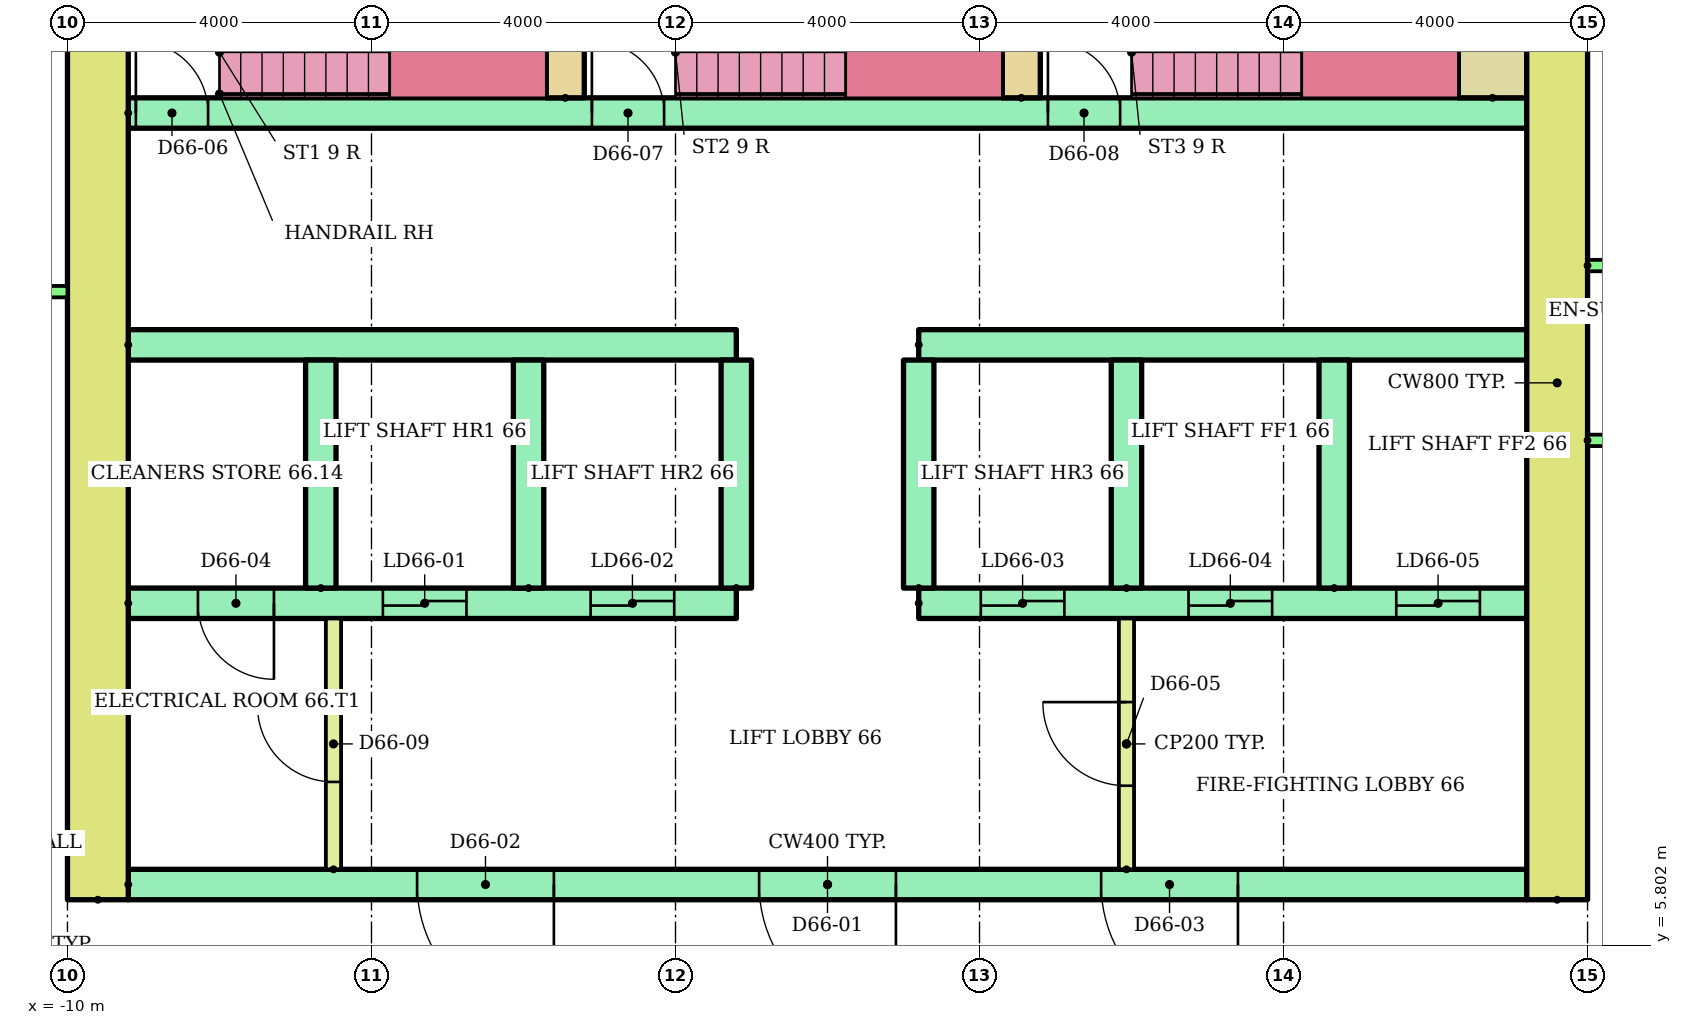
"""IFC4 building model, lengths in metres.
Left out: names, types, materials, properties, quantities, classifications, styles, units other than length and angle.
Written with IfcOpenShell. Run it as: python <this file> out.ifc"""

import sys

from ifc_helpers import new_model, si_unit, direction, frame, frame_2d, origin, place, context, subcontext, project, spatial, rectangle, extrude, element, fill, save


model = new_model("IFC4")
c1 = context("Model", 3, precision=1e-05, world=origin(), true_north=direction((0.0, 1.0)))
c2 = subcontext(c1, "Body", "Model", "MODEL_VIEW")
j1 = project(units=[si_unit("LENGTHUNIT", "METRE"), si_unit("PLANEANGLEUNIT", "RADIAN")], contexts=[c1])
p1 = place(None, origin())
s1 = spatial("IfcSite", under=j1, at=p1, CompositionType="ELEMENT")
p2 = place(p1, origin())
s2 = spatial("IfcBuilding", under=s1, at=p2, CompositionType="ELEMENT")
p3 = place(p2, frame((0.0, 0.0, 256.3)))
s3 = spatial("IfcBuildingStorey", under=s2, at=p3, CompositionType="ELEMENT", Elevation=256.3)
for number, where, z_axis, x_axis in (
    (1, (-9.6, 6.4, 0.0), (0.0, 0.0, 1.0), (0.0, 1.0, 0.0)),
    (2, (9.6, 6.4, 0.0), (0.0, 0.0, 1.0), (0.0, 1.0, 0.0)),
):
    element("IfcWall", number, at=place(p3, frame(where, z_axis=z_axis, x_axis=x_axis)), inside=s3, PredefinedType="SHEAR", context=c2, shape_type="SweptSolid", body=[
        extrude(rectangle(XDim=13.6, YDim=0.8, at=frame_2d((6.8, 0.0))), origin(), (0.0, 0.0, 1.0), 2.92),
    ])
p4 = place(p3, frame((-9.2, 6.6, 0.0)))
e3 = element("IfcWall", 3, at=p4, inside=s3, PredefinedType="SHEAR", context=c2, shape_type="SweptSolid", body=[
    extrude(rectangle(XDim=18.4, YDim=0.4, at=frame_2d((9.2, 0.0))), origin(), (0.0, 0.0, 1.0), 2.92),
])
p5 = place(p4, frame((8.3, 0.0, 0.0)))
e4 = element("IfcOpeningElement", 4, at=p5, cuts=e3, PredefinedType="OPENING", context=c2, shape_type="SweptSolid", body=[
    extrude(rectangle(XDim=1.8, YDim=2.1, at=frame_2d((0.9, 1.05))), frame((0.0, 0.21, 0.0), z_axis=(0.0, -1.0, 0.0), x_axis=(1.0, 0.0, 0.0)), (0.0, 0.0, 1.0), 0.42),
])
p6 = place(p4, frame((3.8, 0.0, 0.0)))
e5 = element("IfcOpeningElement", 5, at=p6, cuts=e3, PredefinedType="OPENING", context=c2, shape_type="SweptSolid", body=[
    extrude(rectangle(XDim=1.8, YDim=2.1, at=frame_2d((0.9, 1.05))), frame((0.0, 0.21, 0.0), z_axis=(0.0, -1.0, 0.0), x_axis=(1.0, 0.0, 0.0)), (0.0, 0.0, 1.0), 0.42),
])
p7 = place(p4, frame((12.8, 0.0, 0.0)))
e6 = element("IfcOpeningElement", 6, at=p7, cuts=e3, PredefinedType="OPENING", context=c2, shape_type="SweptSolid", body=[
    extrude(rectangle(XDim=1.8, YDim=2.1, at=frame_2d((0.9, 1.05))), frame((0.0, 0.21, 0.0), z_axis=(0.0, -1.0, 0.0), x_axis=(1.0, 0.0, 0.0)), (0.0, 0.0, 1.0), 0.42),
])
p8 = place(p3, frame((-9.2, 10.3, 0.0)))
e7 = element("IfcWall", 7, at=p8, inside=s3, PredefinedType="SHEAR", context=c2, shape_type="SweptSolid", body=[
    extrude(rectangle(XDim=8.0, YDim=0.4, at=frame_2d((4.0, 0.0))), origin(), (0.0, 0.0, 1.0), 2.92),
])
p9 = place(p8, frame((3.35, 0.0, 0.0)))
e8 = element("IfcOpeningElement", 8, at=p9, cuts=e7, PredefinedType="OPENING", context=c2, shape_type="SweptSolid", body=[
    extrude(rectangle(XDim=1.1, YDim=2.1, at=frame_2d((0.55, 1.05))), frame((0.0, 0.21, 0.0), z_axis=(0.0, -1.0, 0.0), x_axis=(1.0, 0.0, 0.0)), (0.0, 0.0, 1.0), 0.42),
])
p10 = place(p8, frame((6.083, 0.0, 0.0)))
e9 = element("IfcOpeningElement", 9, at=p10, cuts=e7, PredefinedType="OPENING", context=c2, shape_type="SweptSolid", body=[
    extrude(rectangle(XDim=1.1, YDim=2.1, at=frame_2d((0.55, 1.05))), frame((0.0, 0.21, 0.0), z_axis=(0.0, -1.0, 0.0), x_axis=(1.0, 0.0, 0.0)), (0.0, 0.0, 1.0), 0.42),
])
p11 = place(p8, frame((0.917, 0.0, 0.0)))
e10 = element("IfcOpeningElement", 10, at=p11, cuts=e7, PredefinedType="OPENING", context=c2, shape_type="SweptSolid", body=[
    extrude(rectangle(XDim=1.0, YDim=2.1, at=frame_2d((0.5, 1.05))), frame((0.0, 0.21, 0.0), z_axis=(0.0, -1.0, 0.0), x_axis=(1.0, 0.0, 0.0)), (0.0, 0.0, 1.0), 0.42),
])
p12 = place(p3, frame((-9.2, 13.7, 0.0)))
e11 = element("IfcWall", 11, at=p12, inside=s3, PredefinedType="SHEAR", context=c2, shape_type="SweptSolid", body=[
    extrude(rectangle(XDim=8.0, YDim=0.4, at=frame_2d((4.0, 0.0))), origin(), (0.0, 0.0, 1.0), 2.92),
])
p13 = place(p3, frame((1.2, 10.3, 0.0)))
e12 = element("IfcWall", 12, at=p13, inside=s3, PredefinedType="SHEAR", context=c2, shape_type="SweptSolid", body=[
    extrude(rectangle(XDim=8.0, YDim=0.4, at=frame_2d((4.0, 0.0))), origin(), (0.0, 0.0, 1.0), 2.92),
])
p14 = place(p13, frame((0.817, 0.0, 0.0)))
e13 = element("IfcOpeningElement", 13, at=p14, cuts=e12, PredefinedType="OPENING", context=c2, shape_type="SweptSolid", body=[
    extrude(rectangle(XDim=1.1, YDim=2.1, at=frame_2d((0.55, 1.05))), frame((0.0, 0.21, 0.0), z_axis=(0.0, -1.0, 0.0), x_axis=(1.0, 0.0, 0.0)), (0.0, 0.0, 1.0), 0.42),
])
p15 = place(p13, frame((3.55, 0.0, 0.0)))
e14 = element("IfcOpeningElement", 14, at=p15, cuts=e12, PredefinedType="OPENING", context=c2, shape_type="SweptSolid", body=[
    extrude(rectangle(XDim=1.1, YDim=2.1, at=frame_2d((0.55, 1.05))), frame((0.0, 0.21, 0.0), z_axis=(0.0, -1.0, 0.0), x_axis=(1.0, 0.0, 0.0)), (0.0, 0.0, 1.0), 0.42),
])
p16 = place(p13, frame((6.283, 0.0, 0.0)))
e15 = element("IfcOpeningElement", 15, at=p16, cuts=e12, PredefinedType="OPENING", context=c2, shape_type="SweptSolid", body=[
    extrude(rectangle(XDim=1.1, YDim=2.1, at=frame_2d((0.55, 1.05))), frame((0.0, 0.21, 0.0), z_axis=(0.0, -1.0, 0.0), x_axis=(1.0, 0.0, 0.0)), (0.0, 0.0, 1.0), 0.42),
])
p17 = place(p3, frame((1.2, 13.7, 0.0)))
e16 = element("IfcWall", 16, at=p17, inside=s3, PredefinedType="SHEAR", context=c2, shape_type="SweptSolid", body=[
    extrude(rectangle(XDim=8.0, YDim=0.4, at=frame_2d((4.0, 0.0))), origin(), (0.0, 0.0, 1.0), 2.92),
])
for number, where, z_axis, x_axis in (
    (17, (-6.667, 10.5, 0.0), (0.0, 0.0, 1.0), (0.0, 1.0, 0.0)),
    (18, (-3.933, 10.5, 0.0), (0.0, 0.0, 1.0), (0.0, 1.0, 0.0)),
    (19, (-1.2, 10.5, 0.0), (0.0, 0.0, 1.0), (0.0, 1.0, 0.0)),
    (20, (1.2, 10.5, 0.0), (0.0, 0.0, 1.0), (0.0, 1.0, 0.0)),
    (21, (3.933, 10.5, 0.0), (0.0, 0.0, 1.0), (0.0, 1.0, 0.0)),
    (22, (6.667, 10.5, 0.0), (0.0, 0.0, 1.0), (0.0, 1.0, 0.0)),
):
    element("IfcWall", number, at=place(p3, frame(where, z_axis=z_axis, x_axis=x_axis)), inside=s3, PredefinedType="SHEAR", context=c2, shape_type="SweptSolid", body=[
        extrude(rectangle(XDim=3.0, YDim=0.4, at=frame_2d((1.5, 0.0))), origin(), (0.0, 0.0, 1.0), 2.92),
    ])
p18 = place(p3, frame((3.933, 6.8, 0.0), z_axis=(0.0, 0.0, 1.0), x_axis=(0.0, 1.0, 0.0)))
e23 = element("IfcWall", 23, at=p18, inside=s3, PredefinedType="PARTITIONING", context=c2, shape_type="SweptSolid", body=[
    extrude(rectangle(XDim=3.3, YDim=0.2, at=frame_2d((1.65, 0.0))), origin(), (0.0, 0.0, 1.0), 2.92),
])
p19 = place(p18, frame((1.1, 0.0, 0.0)))
e24 = element("IfcOpeningElement", 24, at=p19, cuts=e23, PredefinedType="OPENING", context=c2, shape_type="SweptSolid", body=[
    extrude(rectangle(XDim=1.1, YDim=2.1, at=frame_2d((0.55, 1.05))), frame((0.0, 0.11, 0.0), z_axis=(0.0, -1.0, 0.0), x_axis=(1.0, 0.0, 0.0)), (0.0, 0.0, 1.0), 0.22),
])
p20 = place(p3, frame((-9.2, 16.75, 0.0)))
e25 = element("IfcWall", 25, at=p20, inside=s3, PredefinedType="SHEAR", context=c2, shape_type="SweptSolid", body=[
    extrude(rectangle(XDim=18.4, YDim=0.4, at=frame_2d((9.2, 0.0))), origin(), (0.0, 0.0, 1.0), 2.92),
])
p21 = place(p20, frame((0.1, 0.0, 0.0)))
e26 = element("IfcOpeningElement", 26, at=p21, cuts=e25, PredefinedType="OPENING", context=c2, shape_type="SweptSolid", body=[
    extrude(rectangle(XDim=0.95, YDim=2.1, at=frame_2d((0.475, 1.05))), frame((0.0, 0.21, 0.0), z_axis=(0.0, -1.0, 0.0), x_axis=(1.0, 0.0, 0.0)), (0.0, 0.0, 1.0), 0.42),
])
p22 = place(p20, frame((6.1, 0.0, 0.0)))
e27 = element("IfcOpeningElement", 27, at=p22, cuts=e25, PredefinedType="OPENING", context=c2, shape_type="SweptSolid", body=[
    extrude(rectangle(XDim=0.95, YDim=2.1, at=frame_2d((0.475, 1.05))), frame((0.0, 0.21, 0.0), z_axis=(0.0, -1.0, 0.0), x_axis=(1.0, 0.0, 0.0)), (0.0, 0.0, 1.0), 0.42),
])
p23 = place(p20, frame((12.1, 0.0, 0.0)))
e28 = element("IfcOpeningElement", 28, at=p23, cuts=e25, PredefinedType="OPENING", context=c2, shape_type="SweptSolid", body=[
    extrude(rectangle(XDim=0.95, YDim=2.1, at=frame_2d((0.475, 1.05))), frame((0.0, 0.21, 0.0), z_axis=(0.0, -1.0, 0.0), x_axis=(1.0, 0.0, 0.0)), (0.0, 0.0, 1.0), 0.42),
])
for number, where, z_axis, x_axis in (
    (29, (-3.45, 16.95, 0.0), (0.0, 0.0, 1.0), (0.0, 1.0, 0.0)),
    (30, (2.55, 16.95, 0.0), (0.0, 0.0, 1.0), (0.0, 1.0, 0.0)),
):
    element("IfcWall", number, at=place(p3, frame(where, z_axis=z_axis, x_axis=x_axis)), inside=s3, PredefinedType="SHEAR", context=c2, shape_type="SweptSolid", body=[
        extrude(rectangle(XDim=2.55, YDim=0.5, at=frame_2d((1.275, 0.0))), origin(), (0.0, 0.0, 1.0), 2.92),
    ])
p24 = place(p3, frame((8.75, 16.95, 0.0), z_axis=(0.0, 0.0, 1.0), x_axis=(0.0, 1.0, 0.0)))
e31 = element("IfcWall", 31, at=p24, inside=s3, PredefinedType="SHEAR", context=c2, shape_type="SweptSolid", body=[
    extrude(rectangle(XDim=2.55, YDim=0.9, at=frame_2d((1.275, 0.0))), origin(), (0.0, 0.0, 1.0), 2.92),
])
p25 = place(p3, frame((-6.5, 6.8, 0.0), z_axis=(0.0, 0.0, 1.0), x_axis=(0.0, 1.0, 0.0)))
e32 = element("IfcWall", 32, at=p25, inside=s3, PredefinedType="PARTITIONING", context=c2, shape_type="SweptSolid", body=[
    extrude(rectangle(XDim=3.3, YDim=0.2, at=frame_2d((1.65, 0.0))), origin(), (0.0, 0.0, 1.0), 2.92),
])
p26 = place(p25, frame((1.15, 0.0, 0.0)))
e33 = element("IfcOpeningElement", 33, at=p26, cuts=e32, PredefinedType="OPENING", context=c2, shape_type="SweptSolid", body=[
    extrude(rectangle(XDim=1.0, YDim=2.1, at=frame_2d((0.5, 1.05))), frame((0.0, 0.11, 0.0), z_axis=(0.0, -1.0, 0.0), x_axis=(1.0, 0.0, 0.0)), (0.0, 0.0, 1.0), 0.22),
])
p27 = place(p3, frame((-21.89, 14.4, 0.0)))
e34 = element("IfcWall", 34, at=p27, inside=s3, PredefinedType="PARTITIONING", context=c2, shape_type="SweptSolid", body=[
    extrude(rectangle(XDim=11.89, YDim=0.15, at=frame_2d((5.945, 0.0))), origin(), (0.0, 0.0, 1.0), 2.4),
])
p28 = place(p27, frame((1.26, 0.0, 0.0)))
e35 = element("IfcOpeningElement", 35, at=p28, cuts=e34, PredefinedType="OPENING", context=c2, shape_type="SweptSolid", body=[
    extrude(rectangle(XDim=1.0, YDim=2.1, at=frame_2d((0.5, 1.05))), frame((0.0, 0.085, 0.0), z_axis=(0.0, -1.0, 0.0), x_axis=(1.0, 0.0, 0.0)), (0.0, 0.0, 1.0), 0.17),
])
p29 = place(p27, frame((8.304, 0.0, 0.0)))
e36 = element("IfcOpeningElement", 36, at=p29, cuts=e34, PredefinedType="OPENING", context=c2, shape_type="SweptSolid", body=[
    extrude(rectangle(XDim=0.9, YDim=2.1, at=frame_2d((0.45, 1.05))), frame((0.0, 0.085, 0.0), z_axis=(0.0, -1.0, 0.0), x_axis=(1.0, 0.0, 0.0)), (0.0, 0.0, 1.0), 0.17),
])
p30 = place(p3, frame((10.0, 12.443, 0.0)))
e37 = element("IfcWall", 37, at=p30, inside=s3, PredefinedType="PARTITIONING", context=c2, shape_type="SweptSolid", body=[
    extrude(rectangle(XDim=22.244, YDim=0.15, at=frame_2d((11.122, 0.0))), origin(), (0.0, 0.0, 1.0), 2.4),
])
p31 = place(p30, frame((3.47, 0.0, 0.0)))
e38 = element("IfcOpeningElement", 38, at=p31, cuts=e37, PredefinedType="OPENING", context=c2, shape_type="SweptSolid", body=[
    extrude(rectangle(XDim=0.9, YDim=2.1, at=frame_2d((0.45, 1.05))), frame((0.0, 0.085, 0.0), z_axis=(0.0, -1.0, 0.0), x_axis=(1.0, 0.0, 0.0)), (0.0, 0.0, 1.0), 0.17),
])
p32 = place(p30, frame((11.318, 0.0, 0.0)))
e39 = element("IfcOpeningElement", 39, at=p32, cuts=e37, PredefinedType="OPENING", context=c2, shape_type="SweptSolid", body=[
    extrude(rectangle(XDim=1.0, YDim=2.1, at=frame_2d((0.5, 1.05))), frame((0.0, 0.085, 0.0), z_axis=(0.0, -1.0, 0.0), x_axis=(1.0, 0.0, 0.0)), (0.0, 0.0, 1.0), 0.17),
])
p33 = place(p30, frame((18.477, 0.0, 0.0)))
e40 = element("IfcOpeningElement", 40, at=p33, cuts=e37, PredefinedType="OPENING", context=c2, shape_type="SweptSolid", body=[
    extrude(rectangle(XDim=0.9, YDim=2.1, at=frame_2d((0.45, 1.05))), frame((0.0, 0.085, 0.0), z_axis=(0.0, -1.0, 0.0), x_axis=(1.0, 0.0, 0.0)), (0.0, 0.0, 1.0), 0.17),
])
p34 = place(p3, frame((10.0, 14.743, 0.0)))
e41 = element("IfcWall", 41, at=p34, inside=s3, PredefinedType="PARTITIONING", context=c2, shape_type="SweptSolid", body=[
    extrude(rectangle(XDim=2.0, YDim=0.15, at=frame_2d((1.0, 0.0))), origin(), (0.0, 0.0, 1.0), 2.4),
])
p35 = place(p5, frame((1.8, 0.0, 0.0), z_axis=(0.0, 0.0, 1.0), x_axis=(-1.0, 0.0, 0.0)))
e42 = element("IfcDoor", 42, at=p35, inside=s3, OperationType="DOUBLE_DOOR_SINGLE_SWING", PredefinedType="DOOR", context=c2, shape_type="SweptSolid", body=[
    extrude(rectangle(XDim=1.8, YDim=2.1, at=frame_2d((0.9, 1.05))), frame((0.0, 0.025, 0.0), z_axis=(0.0, -1.0, 0.0), x_axis=(1.0, 0.0, 0.0)), (0.0, 0.0, 1.0), 0.05),
])
fill(e4, e42)
p36 = place(p6, frame((1.8, 0.0, 0.0), z_axis=(0.0, 0.0, 1.0), x_axis=(-1.0, 0.0, 0.0)))
e43 = element("IfcDoor", 43, at=p36, inside=s3, OperationType="DOUBLE_DOOR_SINGLE_SWING", PredefinedType="DOOR", context=c2, shape_type="SweptSolid", body=[
    extrude(rectangle(XDim=1.8, YDim=2.1, at=frame_2d((0.9, 1.05))), frame((0.0, 0.025, 0.0), z_axis=(0.0, -1.0, 0.0), x_axis=(1.0, 0.0, 0.0)), (0.0, 0.0, 1.0), 0.05),
])
fill(e5, e43)
p37 = place(p7, frame((1.8, 0.0, 0.0), z_axis=(0.0, 0.0, 1.0), x_axis=(-1.0, 0.0, 0.0)))
e44 = element("IfcDoor", 44, at=p37, inside=s3, OperationType="DOUBLE_DOOR_SINGLE_SWING", PredefinedType="DOOR", context=c2, shape_type="SweptSolid", body=[
    extrude(rectangle(XDim=1.8, YDim=2.1, at=frame_2d((0.9, 1.05))), frame((0.0, 0.025, 0.0), z_axis=(0.0, -1.0, 0.0), x_axis=(1.0, 0.0, 0.0)), (0.0, 0.0, 1.0), 0.05),
])
fill(e6, e44)
p38 = place(p9, origin())
e45 = element("IfcDoor", 45, at=p38, inside=s3, OperationType="SLIDING_TO_LEFT", PredefinedType="DOOR", context=c2, shape_type="SweptSolid", body=[
    extrude(rectangle(XDim=1.1, YDim=2.1, at=frame_2d((0.55, 1.05))), frame((0.0, 0.025, 0.0), z_axis=(0.0, -1.0, 0.0), x_axis=(1.0, 0.0, 0.0)), (0.0, 0.0, 1.0), 0.05),
])
fill(e8, e45)
p39 = place(p10, origin())
e46 = element("IfcDoor", 46, at=p39, inside=s3, OperationType="SLIDING_TO_LEFT", PredefinedType="DOOR", context=c2, shape_type="SweptSolid", body=[
    extrude(rectangle(XDim=1.1, YDim=2.1, at=frame_2d((0.55, 1.05))), frame((0.0, 0.025, 0.0), z_axis=(0.0, -1.0, 0.0), x_axis=(1.0, 0.0, 0.0)), (0.0, 0.0, 1.0), 0.05),
])
fill(e9, e46)
p40 = place(p14, origin())
e47 = element("IfcDoor", 47, at=p40, inside=s3, OperationType="SLIDING_TO_LEFT", PredefinedType="DOOR", context=c2, shape_type="SweptSolid", body=[
    extrude(rectangle(XDim=1.1, YDim=2.1, at=frame_2d((0.55, 1.05))), frame((0.0, 0.025, 0.0), z_axis=(0.0, -1.0, 0.0), x_axis=(1.0, 0.0, 0.0)), (0.0, 0.0, 1.0), 0.05),
])
fill(e13, e47)
p41 = place(p15, origin())
e48 = element("IfcDoor", 48, at=p41, inside=s3, OperationType="SLIDING_TO_LEFT", PredefinedType="DOOR", context=c2, shape_type="SweptSolid", body=[
    extrude(rectangle(XDim=1.1, YDim=2.1, at=frame_2d((0.55, 1.05))), frame((0.0, 0.025, 0.0), z_axis=(0.0, -1.0, 0.0), x_axis=(1.0, 0.0, 0.0)), (0.0, 0.0, 1.0), 0.05),
])
fill(e14, e48)
p42 = place(p16, origin())
e49 = element("IfcDoor", 49, at=p42, inside=s3, OperationType="SLIDING_TO_LEFT", PredefinedType="DOOR", context=c2, shape_type="SweptSolid", body=[
    extrude(rectangle(XDim=1.1, YDim=2.1, at=frame_2d((0.55, 1.05))), frame((0.0, 0.025, 0.0), z_axis=(0.0, -1.0, 0.0), x_axis=(1.0, 0.0, 0.0)), (0.0, 0.0, 1.0), 0.05),
])
fill(e15, e49)
p43 = place(p11, frame((1.0, 0.0, 0.0), z_axis=(0.0, 0.0, 1.0), x_axis=(-1.0, 0.0, 0.0)))
e50 = element("IfcDoor", 50, at=p43, inside=s3, OperationType="SINGLE_SWING_RIGHT", PredefinedType="DOOR", context=c2, shape_type="SweptSolid", body=[
    extrude(rectangle(XDim=1.0, YDim=2.1, at=frame_2d((0.5, 1.05))), frame((0.0, 0.025, 0.0), z_axis=(0.0, -1.0, 0.0), x_axis=(1.0, 0.0, 0.0)), (0.0, 0.0, 1.0), 0.05),
])
fill(e10, e50)
p44 = place(p19, origin())
e51 = element("IfcDoor", 51, at=p44, inside=s3, OperationType="SINGLE_SWING_RIGHT", PredefinedType="DOOR", context=c2, shape_type="SweptSolid", body=[
    extrude(rectangle(XDim=1.1, YDim=2.1, at=frame_2d((0.55, 1.05))), frame((0.0, 0.025, 0.0), z_axis=(0.0, -1.0, 0.0), x_axis=(1.0, 0.0, 0.0)), (0.0, 0.0, 1.0), 0.05),
])
fill(e24, e51)
p45 = place(p21, origin())
e52 = element("IfcDoor", 52, at=p45, inside=s3, OperationType="SINGLE_SWING_LEFT", PredefinedType="DOOR", context=c2, shape_type="SweptSolid", body=[
    extrude(rectangle(XDim=0.95, YDim=2.1, at=frame_2d((0.475, 1.05))), frame((0.0, 0.025, 0.0), z_axis=(0.0, -1.0, 0.0), x_axis=(1.0, 0.0, 0.0)), (0.0, 0.0, 1.0), 0.05),
])
fill(e26, e52)
p46 = place(p22, origin())
e53 = element("IfcDoor", 53, at=p46, inside=s3, OperationType="SINGLE_SWING_LEFT", PredefinedType="DOOR", context=c2, shape_type="SweptSolid", body=[
    extrude(rectangle(XDim=0.95, YDim=2.1, at=frame_2d((0.475, 1.05))), frame((0.0, 0.025, 0.0), z_axis=(0.0, -1.0, 0.0), x_axis=(1.0, 0.0, 0.0)), (0.0, 0.0, 1.0), 0.05),
])
fill(e27, e53)
p47 = place(p23, origin())
e54 = element("IfcDoor", 54, at=p47, inside=s3, OperationType="SINGLE_SWING_LEFT", PredefinedType="DOOR", context=c2, shape_type="SweptSolid", body=[
    extrude(rectangle(XDim=0.95, YDim=2.1, at=frame_2d((0.475, 1.05))), frame((0.0, 0.025, 0.0), z_axis=(0.0, -1.0, 0.0), x_axis=(1.0, 0.0, 0.0)), (0.0, 0.0, 1.0), 0.05),
])
fill(e28, e54)
p48 = place(p26, origin())
e55 = element("IfcDoor", 55, at=p48, inside=s3, OperationType="SINGLE_SWING_RIGHT", PredefinedType="DOOR", context=c2, shape_type="SweptSolid", body=[
    extrude(rectangle(XDim=1.0, YDim=2.1, at=frame_2d((0.5, 1.05))), frame((0.0, 0.025, 0.0), z_axis=(0.0, -1.0, 0.0), x_axis=(1.0, 0.0, 0.0)), (0.0, 0.0, 1.0), 0.05),
])
fill(e33, e55)
save(model, sys.argv[1])
